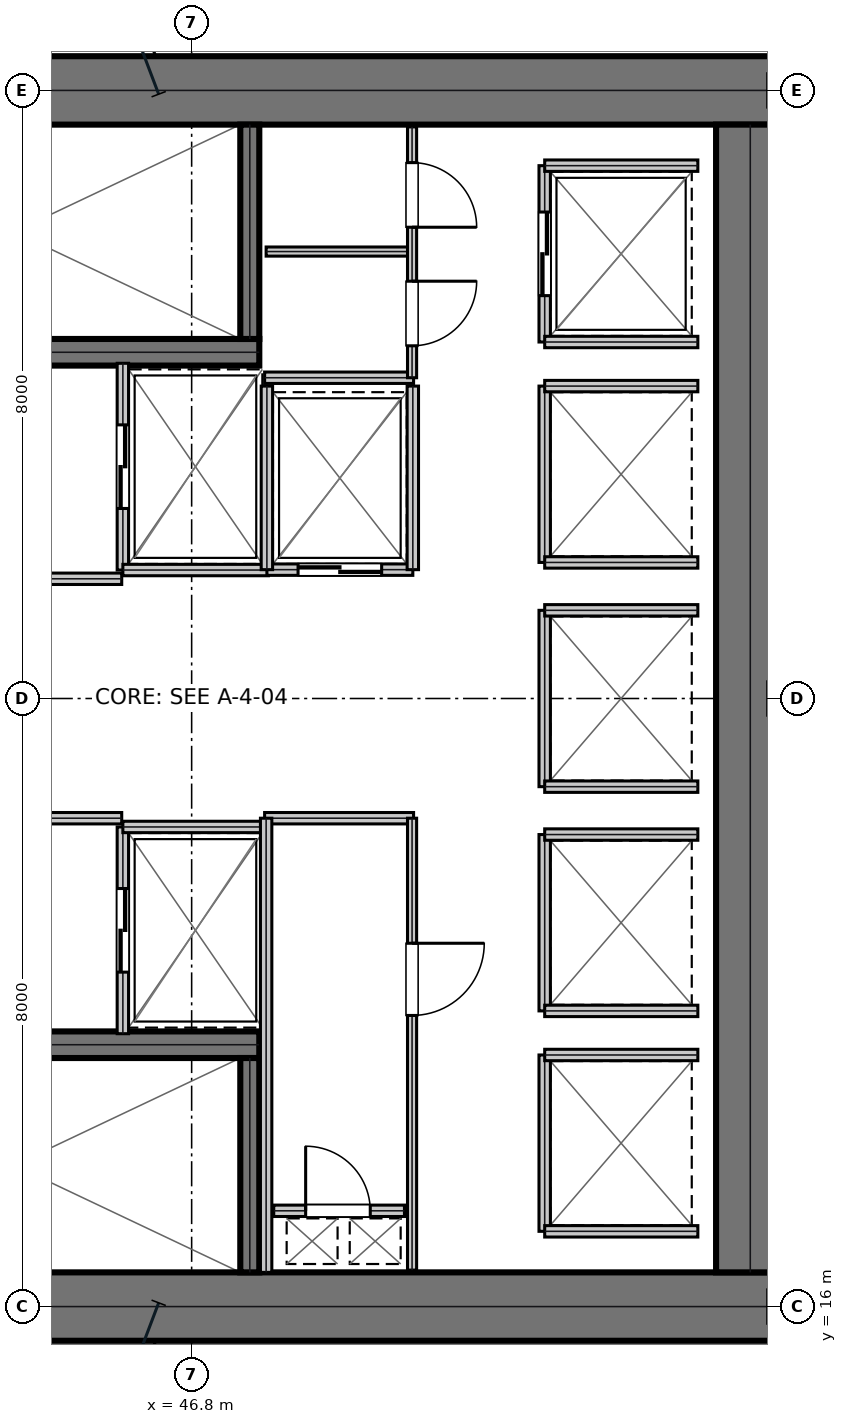
"""IFC4 building model, lengths in metres.
Left out: names, types, materials, properties, quantities, classifications, styles, units other than length and angle.
Written with IfcOpenShell. Run it as: python <this file> out.ifc"""

import sys

from ifc_helpers import new_model, si_unit, direction, frame, frame_2d, origin, place, context, subcontext, project, spatial, rectangle, extrude, element, fill, save


model = new_model("IFC4")
c1 = context("Model", 3, precision=1e-05, world=origin(), true_north=direction((0.0, 1.0)))
c2 = subcontext(c1, "Body", "Model", "MODEL_VIEW")
j1 = project(units=[si_unit("LENGTHUNIT", "METRE"), si_unit("PLANEANGLEUNIT", "RADIAN")], contexts=[c1])
p1 = place(None, origin())
s1 = spatial("IfcSite", under=j1, at=p1, CompositionType="ELEMENT")
p2 = place(p1, origin())
s2 = spatial("IfcBuilding", under=s1, at=p2, CompositionType="ELEMENT")
p3 = place(p2, frame((0.0, 0.0, 37.8)))
s3 = spatial("IfcBuildingStorey", under=s2, at=p3, CompositionType="ELEMENT", Elevation=37.8)
for number, where, z_axis, x_axis in (
    (1, (38.8, 32.0, 0.0), (0.0, 0.0, 1.0), (1.0, 0.0, 0.0)),
    (2, (38.8, 16.0, 0.0), (0.0, 0.0, 1.0), (1.0, 0.0, 0.0)),
):
    element("IfcWall", number, at=place(p3, frame(where, z_axis=z_axis, x_axis=x_axis)), inside=s3, PredefinedType="SHEAR", context=c2, shape_type="SweptSolid", body=[
        extrude(rectangle(XDim=16.0, YDim=0.9, at=frame_2d((8.0, 0.0))), origin(), (0.0, 0.0, 1.0), 3.81),
    ])
p4 = place(p3, frame((54.15, 16.45, 0.0), z_axis=(0.0, 0.0, 1.0), x_axis=(0.0, 1.0, 0.0)))
e3 = element("IfcWall", 3, at=p4, inside=s3, PredefinedType="SHEAR", context=c2, shape_type="SweptSolid", body=[
    extrude(rectangle(XDim=15.1, YDim=0.9, at=frame_2d((7.55, 0.0))), origin(), (0.0, 0.0, 1.0), 3.81),
])
p5 = place(p3, frame((39.98, 28.555, 0.0), z_axis=(0.0, 0.0, 1.0), x_axis=(1.0, 0.0, 0.0)))
e4 = element("IfcWall", 4, at=p5, inside=s3, PredefinedType="SHEAR", context=c2, shape_type="SweptSolid", body=[
    extrude(rectangle(XDim=7.71, YDim=0.35, at=frame_2d((3.855, 0.0))), origin(), (0.0, 0.0, 1.0), 3.81),
])
p6 = place(p5, frame((0.25, 0.0, 0.0)))
e5 = element("IfcOpeningElement", 5, at=p6, cuts=e4, PredefinedType="OPENING", context=c2, shape_type="SweptSolid", body=[
    extrude(rectangle(XDim=1.1, YDim=2.15, at=frame_2d((0.55, 1.075))), frame((0.0, 0.185, 0.0), z_axis=(0.0, -1.0, 0.0), x_axis=(1.0, 0.0, 0.0)), (0.0, 0.0, 1.0), 0.37),
])
p7 = place(p3, frame((39.98, 19.445, 0.0), z_axis=(0.0, 0.0, 1.0), x_axis=(1.0, 0.0, 0.0)))
e6 = element("IfcWall", 6, at=p7, inside=s3, PredefinedType="SHEAR", context=c2, shape_type="SweptSolid", body=[
    extrude(rectangle(XDim=7.71, YDim=0.35, at=frame_2d((3.855, 0.0))), origin(), (0.0, 0.0, 1.0), 3.81),
])
p8 = place(p7, frame((0.25, 0.0, 0.0)))
e7 = element("IfcOpeningElement", 7, at=p8, cuts=e6, PredefinedType="OPENING", context=c2, shape_type="SweptSolid", body=[
    extrude(rectangle(XDim=1.1, YDim=2.15, at=frame_2d((0.55, 1.075))), frame((0.0, 0.185, 0.0), z_axis=(0.0, -1.0, 0.0), x_axis=(1.0, 0.0, 0.0)), (0.0, 0.0, 1.0), 0.37),
])
for number, where, z_axis, x_axis in (
    (8, (47.565, 28.73, 0.0), (0.0, 0.0, 1.0), (0.0, 1.0, 0.0)),
    (9, (47.565, 16.45, 0.0), (0.0, 0.0, 1.0), (0.0, 1.0, 0.0)),
):
    element("IfcWall", number, at=place(p3, frame(where, z_axis=z_axis, x_axis=x_axis)), inside=s3, PredefinedType="SHEAR", context=c2, shape_type="SweptSolid", body=[
        extrude(rectangle(XDim=2.82, YDim=0.25, at=frame_2d((1.41, 0.0))), origin(), (0.0, 0.0, 1.0), 3.81),
    ])
p9 = place(p3, frame((39.98, 25.575, 0.0), z_axis=(0.0, 0.0, 1.0), x_axis=(1.0, 0.0, 0.0)))
e10 = element("IfcWall", 10, at=p9, inside=s3, PredefinedType="PARTITIONING", context=c2, shape_type="SweptSolid", body=[
    extrude(rectangle(XDim=5.9, YDim=0.15, at=frame_2d((2.95, 0.0))), origin(), (0.0, 0.0, 1.0), 3.81),
])
p10 = place(p9, frame((2.35, 0.0, 0.0)))
e11 = element("IfcOpeningElement", 11, at=p10, cuts=e10, PredefinedType="OPENING", context=c2, shape_type="SweptSolid", body=[
    extrude(rectangle(XDim=1.05, YDim=2.15, at=frame_2d((0.525, 1.075))), frame((0.0, 0.085, 0.0), z_axis=(0.0, -1.0, 0.0), x_axis=(1.0, 0.0, 0.0)), (0.0, 0.0, 1.0), 0.17),
])
p11 = place(p3, frame((39.98, 22.425, 0.0), z_axis=(0.0, 0.0, 1.0), x_axis=(1.0, 0.0, 0.0)))
e12 = element("IfcWall", 12, at=p11, inside=s3, PredefinedType="PARTITIONING", context=c2, shape_type="SweptSolid", body=[
    extrude(rectangle(XDim=5.9, YDim=0.15, at=frame_2d((2.95, 0.0))), origin(), (0.0, 0.0, 1.0), 3.81),
])
p12 = place(p11, frame((2.35, 0.0, 0.0)))
e13 = element("IfcOpeningElement", 13, at=p12, cuts=e12, PredefinedType="OPENING", context=c2, shape_type="SweptSolid", body=[
    extrude(rectangle(XDim=1.05, YDim=2.15, at=frame_2d((0.525, 1.075))), frame((0.0, 0.085, 0.0), z_axis=(0.0, -1.0, 0.0), x_axis=(1.0, 0.0, 0.0)), (0.0, 0.0, 1.0), 0.17),
])
p13 = place(p3, frame((45.895, 25.69, 0.0), z_axis=(0.0, 0.0, 1.0), x_axis=(0.0, 1.0, 0.0)))
e14 = element("IfcWall", 14, at=p13, inside=s3, PredefinedType="PARTITIONING", context=c2, shape_type="SweptSolid", body=[
    extrude(rectangle(XDim=2.72, YDim=0.15, at=frame_2d((1.36, 0.0))), origin(), (0.0, 0.0, 1.0), 3.81),
])
p14 = place(p13, frame((0.81, 0.0, 0.0)))
e15 = element("IfcOpeningElement", 15, at=p14, cuts=e14, PredefinedType="OPENING", context=c2, shape_type="SweptSolid", body=[
    extrude(rectangle(XDim=1.1, YDim=2.15, at=frame_2d((0.55, 1.075))), frame((0.0, 0.085, 0.0), z_axis=(0.0, -1.0, 0.0), x_axis=(1.0, 0.0, 0.0)), (0.0, 0.0, 1.0), 0.17),
])
p15 = place(p3, frame((45.895, 25.69, 0.0), z_axis=(0.0, 0.0, 1.0), x_axis=(1.0, 0.0, 0.0)))
e16 = element("IfcWall", 16, at=p15, inside=s3, PredefinedType="PARTITIONING", context=c2, shape_type="SweptSolid", body=[
    extrude(rectangle(XDim=1.915, YDim=0.15, at=frame_2d((0.958, 0.0))), origin(), (0.0, 0.0, 1.0), 3.81),
])
p16 = place(p3, frame((45.895, 19.59, 0.0), z_axis=(0.0, 0.0, 1.0), x_axis=(0.0, 1.0, 0.0)))
e17 = element("IfcWall", 17, at=p16, inside=s3, PredefinedType="PARTITIONING", context=c2, shape_type="SweptSolid", body=[
    extrude(rectangle(XDim=2.72, YDim=0.15, at=frame_2d((1.36, 0.0))), origin(), (0.0, 0.0, 1.0), 3.81),
])
p17 = place(p16, frame((0.81, 0.0, 0.0)))
e18 = element("IfcOpeningElement", 18, at=p17, cuts=e17, PredefinedType="OPENING", context=c2, shape_type="SweptSolid", body=[
    extrude(rectangle(XDim=1.1, YDim=2.15, at=frame_2d((0.55, 1.075))), frame((0.0, 0.085, 0.0), z_axis=(0.0, -1.0, 0.0), x_axis=(1.0, 0.0, 0.0)), (0.0, 0.0, 1.0), 0.17),
])
p18 = place(p3, frame((45.895, 22.31, 0.0), z_axis=(0.0, 0.0, 1.0), x_axis=(1.0, 0.0, 0.0)))
e19 = element("IfcWall", 19, at=p18, inside=s3, PredefinedType="PARTITIONING", context=c2, shape_type="SweptSolid", body=[
    extrude(rectangle(XDim=1.915, YDim=0.15, at=frame_2d((0.958, 0.0))), origin(), (0.0, 0.0, 1.0), 3.81),
])
p19 = place(p3, frame((47.79, 25.695, 0.0), z_axis=(0.0, 0.0, 1.0), x_axis=(1.0, 0.0, 0.0)))
e20 = element("IfcWall", 20, at=p19, inside=s3, PredefinedType="PARTITIONING", context=c2, shape_type="SweptSolid", body=[
    extrude(rectangle(XDim=1.92, YDim=0.15, at=frame_2d((0.96, 0.0))), origin(), (0.0, 0.0, 1.0), 3.81),
])
p20 = place(p19, frame((0.41, 0.0, 0.0)))
e21 = element("IfcOpeningElement", 21, at=p20, cuts=e20, PredefinedType="OPENING", context=c2, shape_type="SweptSolid", body=[
    extrude(rectangle(XDim=1.1, YDim=2.15, at=frame_2d((0.55, 1.075))), frame((0.0, 0.085, 0.0), z_axis=(0.0, -1.0, 0.0), x_axis=(1.0, 0.0, 0.0)), (0.0, 0.0, 1.0), 0.17),
])
for number, where, z_axis, x_axis in (
    (22, (47.79, 25.695, 0.0), (0.0, 0.0, 1.0), (0.0, 1.0, 0.0)),
    (23, (49.71, 25.695, 0.0), (0.0, 0.0, 1.0), (0.0, 1.0, 0.0)),
):
    element("IfcWall", number, at=place(p3, frame(where, z_axis=z_axis, x_axis=x_axis)), inside=s3, PredefinedType="PARTITIONING", context=c2, shape_type="SweptSolid", body=[
        extrude(rectangle(XDim=2.415, YDim=0.15, at=frame_2d((1.208, 0.0))), origin(), (0.0, 0.0, 1.0), 3.81),
    ])
p21 = place(p3, frame((51.445, 28.69, 0.0), z_axis=(0.0, 0.0, 1.0), x_axis=(0.0, 1.0, 0.0)))
e24 = element("IfcWall", 24, at=p21, inside=s3, PredefinedType="PARTITIONING", context=c2, shape_type="SweptSolid", body=[
    extrude(rectangle(XDim=2.32, YDim=0.15, at=frame_2d((1.16, 0.0))), origin(), (0.0, 0.0, 1.0), 3.81),
])
p22 = place(p21, frame((0.61, 0.0, 0.0)))
e25 = element("IfcOpeningElement", 25, at=p22, cuts=e24, PredefinedType="OPENING", context=c2, shape_type="SweptSolid", body=[
    extrude(rectangle(XDim=1.1, YDim=2.15, at=frame_2d((0.55, 1.075))), frame((0.0, 0.085, 0.0), z_axis=(0.0, -1.0, 0.0), x_axis=(1.0, 0.0, 0.0)), (0.0, 0.0, 1.0), 0.17),
])
for number, where, z_axis, x_axis in (
    (26, (51.445, 28.69, 0.0), (0.0, 0.0, 1.0), (1.0, 0.0, 0.0)),
    (27, (51.445, 31.01, 0.0), (0.0, 0.0, 1.0), (1.0, 0.0, 0.0)),
):
    element("IfcWall", number, at=place(p3, frame(where, z_axis=z_axis, x_axis=x_axis)), inside=s3, PredefinedType="PARTITIONING", context=c2, shape_type="SweptSolid", body=[
        extrude(rectangle(XDim=2.015, YDim=0.15, at=frame_2d((1.007, 0.0))), origin(), (0.0, 0.0, 1.0), 3.81),
    ])
p23 = place(p3, frame((51.445, 25.79, 0.0), z_axis=(0.0, 0.0, 1.0), x_axis=(0.0, 1.0, 0.0)))
e28 = element("IfcWall", 28, at=p23, inside=s3, PredefinedType="PARTITIONING", context=c2, shape_type="SweptSolid", body=[
    extrude(rectangle(XDim=2.32, YDim=0.15, at=frame_2d((1.16, 0.0))), origin(), (0.0, 0.0, 1.0), 3.81),
])
for number, where, z_axis, x_axis in (
    (29, (51.445, 25.79, 0.0), (0.0, 0.0, 1.0), (1.0, 0.0, 0.0)),
    (30, (51.445, 28.11, 0.0), (0.0, 0.0, 1.0), (1.0, 0.0, 0.0)),
):
    element("IfcWall", number, at=place(p3, frame(where, z_axis=z_axis, x_axis=x_axis)), inside=s3, PredefinedType="PARTITIONING", context=c2, shape_type="SweptSolid", body=[
        extrude(rectangle(XDim=2.015, YDim=0.15, at=frame_2d((1.007, 0.0))), origin(), (0.0, 0.0, 1.0), 3.81),
    ])
p24 = place(p3, frame((51.445, 19.89, 0.0), z_axis=(0.0, 0.0, 1.0), x_axis=(0.0, 1.0, 0.0)))
e31 = element("IfcWall", 31, at=p24, inside=s3, PredefinedType="PARTITIONING", context=c2, shape_type="SweptSolid", body=[
    extrude(rectangle(XDim=2.32, YDim=0.15, at=frame_2d((1.16, 0.0))), origin(), (0.0, 0.0, 1.0), 3.81),
])
for number, where, z_axis, x_axis in (
    (32, (51.445, 19.89, 0.0), (0.0, 0.0, 1.0), (1.0, 0.0, 0.0)),
    (33, (51.445, 22.21, 0.0), (0.0, 0.0, 1.0), (1.0, 0.0, 0.0)),
):
    element("IfcWall", number, at=place(p3, frame(where, z_axis=z_axis, x_axis=x_axis)), inside=s3, PredefinedType="PARTITIONING", context=c2, shape_type="SweptSolid", body=[
        extrude(rectangle(XDim=2.015, YDim=0.15, at=frame_2d((1.007, 0.0))), origin(), (0.0, 0.0, 1.0), 3.81),
    ])
p25 = place(p3, frame((51.445, 22.84, 0.0), z_axis=(0.0, 0.0, 1.0), x_axis=(0.0, 1.0, 0.0)))
e34 = element("IfcWall", 34, at=p25, inside=s3, PredefinedType="PARTITIONING", context=c2, shape_type="SweptSolid", body=[
    extrude(rectangle(XDim=2.32, YDim=0.15, at=frame_2d((1.16, 0.0))), origin(), (0.0, 0.0, 1.0), 3.81),
])
for number, where, z_axis, x_axis in (
    (35, (51.445, 22.84, 0.0), (0.0, 0.0, 1.0), (1.0, 0.0, 0.0)),
    (36, (51.445, 25.16, 0.0), (0.0, 0.0, 1.0), (1.0, 0.0, 0.0)),
):
    element("IfcWall", number, at=place(p3, frame(where, z_axis=z_axis, x_axis=x_axis)), inside=s3, PredefinedType="PARTITIONING", context=c2, shape_type="SweptSolid", body=[
        extrude(rectangle(XDim=2.015, YDim=0.15, at=frame_2d((1.007, 0.0))), origin(), (0.0, 0.0, 1.0), 3.81),
    ])
p26 = place(p3, frame((51.445, 16.99, 0.0), z_axis=(0.0, 0.0, 1.0), x_axis=(0.0, 1.0, 0.0)))
e37 = element("IfcWall", 37, at=p26, inside=s3, PredefinedType="PARTITIONING", context=c2, shape_type="SweptSolid", body=[
    extrude(rectangle(XDim=2.32, YDim=0.15, at=frame_2d((1.16, 0.0))), origin(), (0.0, 0.0, 1.0), 3.81),
])
for number, where, z_axis, x_axis in (
    (38, (51.445, 16.99, 0.0), (0.0, 0.0, 1.0), (1.0, 0.0, 0.0)),
    (39, (51.445, 19.31, 0.0), (0.0, 0.0, 1.0), (1.0, 0.0, 0.0)),
):
    element("IfcWall", number, at=place(p3, frame(where, z_axis=z_axis, x_axis=x_axis)), inside=s3, PredefinedType="PARTITIONING", context=c2, shape_type="SweptSolid", body=[
        extrude(rectangle(XDim=2.015, YDim=0.15, at=frame_2d((1.007, 0.0))), origin(), (0.0, 0.0, 1.0), 3.81),
    ])
p27 = place(p3, frame((47.88, 17.26, 0.0), z_axis=(0.0, 0.0, 1.0), x_axis=(1.0, 0.0, 0.0)))
e40 = element("IfcWall", 40, at=p27, inside=s3, PredefinedType="PARTITIONING", context=c2, shape_type="SweptSolid", body=[
    extrude(rectangle(XDim=1.72, YDim=0.15, at=frame_2d((0.86, 0.0))), origin(), (0.0, 0.0, 1.0), 3.81),
])
p28 = place(p27, frame((0.42, 0.0, 0.0)))
e41 = element("IfcOpeningElement", 41, at=p28, cuts=e40, PredefinedType="OPENING", context=c2, shape_type="SweptSolid", body=[
    extrude(rectangle(XDim=0.85, YDim=2.15, at=frame_2d((0.425, 1.075))), frame((0.0, 0.085, 0.0), z_axis=(0.0, -1.0, 0.0), x_axis=(1.0, 0.0, 0.0)), (0.0, 0.0, 1.0), 0.17),
])
p29 = place(p3, frame((47.76, 22.425, 0.0), z_axis=(0.0, 0.0, 1.0), x_axis=(1.0, 0.0, 0.0)))
e42 = element("IfcWall", 42, at=p29, inside=s3, PredefinedType="PARTITIONING", context=c2, shape_type="SweptSolid", body=[
    extrude(rectangle(XDim=1.96, YDim=0.15, at=frame_2d((0.98, 0.0))), origin(), (0.0, 0.0, 1.0), 3.81),
])
p30 = place(p3, frame((47.78, 16.45, 0.0), z_axis=(0.0, 0.0, 1.0), x_axis=(0.0, 1.0, 0.0)))
e43 = element("IfcWall", 43, at=p30, inside=s3, PredefinedType="PARTITIONING", context=c2, shape_type="SweptSolid", body=[
    extrude(rectangle(XDim=5.975, YDim=0.15, at=frame_2d((2.988, 0.0))), origin(), (0.0, 0.0, 1.0), 3.81),
])
p31 = place(p3, frame((49.7, 16.48, 0.0), z_axis=(0.0, 0.0, 1.0), x_axis=(0.0, 1.0, 0.0)))
e44 = element("IfcWall", 44, at=p31, inside=s3, PredefinedType="PARTITIONING", context=c2, shape_type="SweptSolid", body=[
    extrude(rectangle(XDim=5.945, YDim=0.12, at=frame_2d((2.973, 0.0))), origin(), (0.0, 0.0, 1.0), 3.81),
])
p32 = place(p31, frame((3.35, 0.0, 0.0)))
e45 = element("IfcOpeningElement", 45, at=p32, cuts=e44, PredefinedType="OPENING", context=c2, shape_type="SweptSolid", body=[
    extrude(rectangle(XDim=0.95, YDim=2.15, at=frame_2d((0.475, 1.075))), frame((0.0, 0.07, 0.0), z_axis=(0.0, -1.0, 0.0), x_axis=(1.0, 0.0, 0.0)), (0.0, 0.0, 1.0), 0.14),
])
p33 = place(p3, frame((47.76, 28.22, 0.0), z_axis=(0.0, 0.0, 1.0), x_axis=(1.0, 0.0, 0.0)))
e46 = element("IfcWall", 46, at=p33, inside=s3, PredefinedType="PARTITIONING", context=c2, shape_type="SweptSolid", body=[
    extrude(rectangle(XDim=1.96, YDim=0.15, at=frame_2d((0.98, 0.0))), origin(), (0.0, 0.0, 1.0), 3.81),
])
p34 = place(p3, frame((47.78, 29.88, 0.0), z_axis=(0.0, 0.0, 1.0), x_axis=(1.0, 0.0, 0.0)))
e47 = element("IfcWall", 47, at=p34, inside=s3, PredefinedType="PARTITIONING", context=c2, shape_type="SweptSolid", body=[
    extrude(rectangle(XDim=1.92, YDim=0.12, at=frame_2d((0.96, 0.0))), origin(), (0.0, 0.0, 1.0), 3.81),
])
p35 = place(p3, frame((49.7, 28.22, 0.0), z_axis=(0.0, 0.0, 1.0), x_axis=(0.0, 1.0, 0.0)))
e48 = element("IfcWall", 48, at=p35, inside=s3, PredefinedType="PARTITIONING", context=c2, shape_type="SweptSolid", body=[
    extrude(rectangle(XDim=3.3, YDim=0.12, at=frame_2d((1.65, 0.0))), origin(), (0.0, 0.0, 1.0), 3.81),
])
p36 = place(p35, frame((0.42, 0.0, 0.0)))
e49 = element("IfcOpeningElement", 49, at=p36, cuts=e48, PredefinedType="OPENING", context=c2, shape_type="SweptSolid", body=[
    extrude(rectangle(XDim=0.85, YDim=2.15, at=frame_2d((0.425, 1.075))), frame((0.0, 0.07, 0.0), z_axis=(0.0, -1.0, 0.0), x_axis=(1.0, 0.0, 0.0)), (0.0, 0.0, 1.0), 0.14),
])
p37 = place(p35, frame((1.98, 0.0, 0.0)))
e50 = element("IfcOpeningElement", 50, at=p37, cuts=e48, PredefinedType="OPENING", context=c2, shape_type="SweptSolid", body=[
    extrude(rectangle(XDim=0.85, YDim=2.15, at=frame_2d((0.425, 1.075))), frame((0.0, 0.07, 0.0), z_axis=(0.0, -1.0, 0.0), x_axis=(1.0, 0.0, 0.0)), (0.0, 0.0, 1.0), 0.14),
])
p38 = place(p14, frame((1.1, 0.0, 0.0), z_axis=(0.0, 0.0, 1.0), x_axis=(-1.0, 0.0, 0.0)))
e51 = element("IfcDoor", 51, at=p38, inside=s3, OperationType="DOUBLE_DOOR_SLIDING", PredefinedType="DOOR", context=c2, shape_type="SweptSolid", body=[
    extrude(rectangle(XDim=1.1, YDim=2.15, at=frame_2d((0.55, 1.075))), frame((0.0, 0.025, 0.0), z_axis=(0.0, -1.0, 0.0), x_axis=(1.0, 0.0, 0.0)), (0.0, 0.0, 1.0), 0.05),
])
fill(e15, e51)
p39 = place(p17, frame((1.1, 0.0, 0.0), z_axis=(0.0, 0.0, 1.0), x_axis=(-1.0, 0.0, 0.0)))
e52 = element("IfcDoor", 52, at=p39, inside=s3, OperationType="DOUBLE_DOOR_SLIDING", PredefinedType="DOOR", context=c2, shape_type="SweptSolid", body=[
    extrude(rectangle(XDim=1.1, YDim=2.15, at=frame_2d((0.55, 1.075))), frame((0.0, 0.025, 0.0), z_axis=(0.0, -1.0, 0.0), x_axis=(1.0, 0.0, 0.0)), (0.0, 0.0, 1.0), 0.05),
])
fill(e18, e52)
p40 = place(p20, frame((1.1, 0.0, 0.0), z_axis=(0.0, 0.0, 1.0), x_axis=(-1.0, 0.0, 0.0)))
e53 = element("IfcDoor", 53, at=p40, inside=s3, OperationType="DOUBLE_DOOR_SLIDING", PredefinedType="DOOR", context=c2, shape_type="SweptSolid", body=[
    extrude(rectangle(XDim=1.1, YDim=2.15, at=frame_2d((0.55, 1.075))), frame((0.0, 0.025, 0.0), z_axis=(0.0, -1.0, 0.0), x_axis=(1.0, 0.0, 0.0)), (0.0, 0.0, 1.0), 0.05),
])
fill(e21, e53)
p41 = place(p22, frame((1.1, 0.0, 0.0), z_axis=(0.0, 0.0, 1.0), x_axis=(-1.0, 0.0, 0.0)))
e54 = element("IfcDoor", 54, at=p41, inside=s3, OperationType="DOUBLE_DOOR_SLIDING", PredefinedType="DOOR", context=c2, shape_type="SweptSolid", body=[
    extrude(rectangle(XDim=1.1, YDim=2.15, at=frame_2d((0.55, 1.075))), frame((0.0, 0.025, 0.0), z_axis=(0.0, -1.0, 0.0), x_axis=(1.0, 0.0, 0.0)), (0.0, 0.0, 1.0), 0.05),
])
fill(e25, e54)
p42 = place(p28, origin())
e55 = element("IfcDoor", 55, at=p42, inside=s3, OperationType="SINGLE_SWING_LEFT", PredefinedType="TRAPDOOR", context=c2, shape_type="SweptSolid", body=[
    extrude(rectangle(XDim=0.85, YDim=2.15, at=frame_2d((0.425, 1.075))), frame((0.0, 0.025, 0.0), z_axis=(0.0, -1.0, 0.0), x_axis=(1.0, 0.0, 0.0)), (0.0, 0.0, 1.0), 0.05),
])
fill(e41, e55)
p43 = place(p32, frame((0.95, 0.0, 0.0), z_axis=(0.0, 0.0, 1.0), x_axis=(-1.0, 0.0, 0.0)))
e56 = element("IfcDoor", 56, at=p43, inside=s3, OperationType="SINGLE_SWING_LEFT", PredefinedType="DOOR", context=c2, shape_type="SweptSolid", body=[
    extrude(rectangle(XDim=0.95, YDim=2.15, at=frame_2d((0.475, 1.075))), frame((0.0, 0.025, 0.0), z_axis=(0.0, -1.0, 0.0), x_axis=(1.0, 0.0, 0.0)), (0.0, 0.0, 1.0), 0.05),
])
fill(e45, e56)
p44 = place(p36, frame((0.85, 0.0, 0.0), z_axis=(0.0, 0.0, 1.0), x_axis=(-1.0, 0.0, 0.0)))
e57 = element("IfcDoor", 57, at=p44, inside=s3, OperationType="SINGLE_SWING_LEFT", PredefinedType="DOOR", context=c2, shape_type="SweptSolid", body=[
    extrude(rectangle(XDim=0.85, YDim=2.15, at=frame_2d((0.425, 1.075))), frame((0.0, 0.025, 0.0), z_axis=(0.0, -1.0, 0.0), x_axis=(1.0, 0.0, 0.0)), (0.0, 0.0, 1.0), 0.05),
])
fill(e49, e57)
p45 = place(p37, frame((0.85, 0.0, 0.0), z_axis=(0.0, 0.0, 1.0), x_axis=(-1.0, 0.0, 0.0)))
e58 = element("IfcDoor", 58, at=p45, inside=s3, OperationType="SINGLE_SWING_RIGHT", PredefinedType="DOOR", context=c2, shape_type="SweptSolid", body=[
    extrude(rectangle(XDim=0.85, YDim=2.15, at=frame_2d((0.425, 1.075))), frame((0.0, 0.025, 0.0), z_axis=(0.0, -1.0, 0.0), x_axis=(1.0, 0.0, 0.0)), (0.0, 0.0, 1.0), 0.05),
])
fill(e50, e58)
save(model, sys.argv[1])
